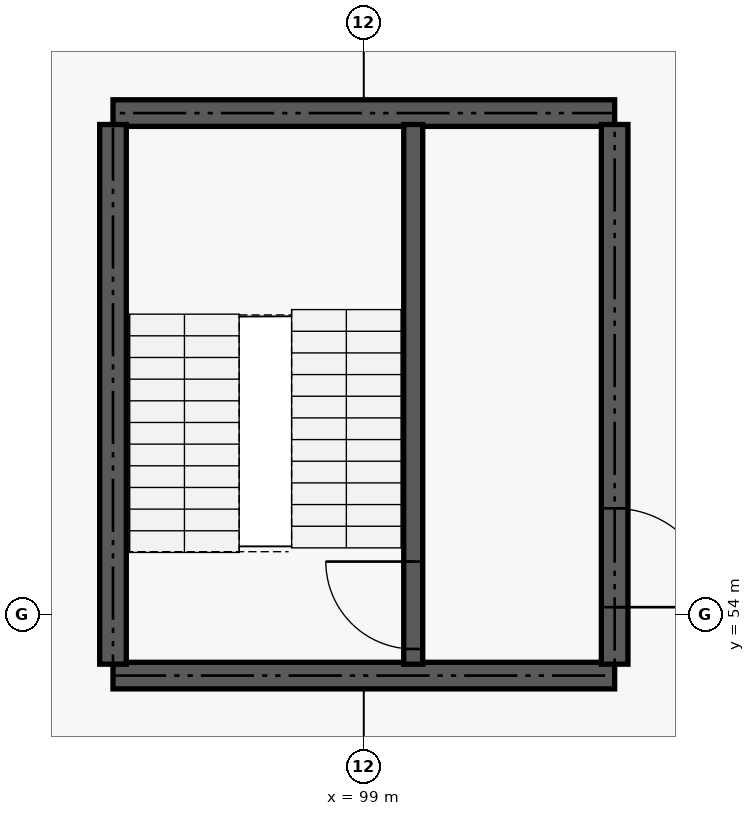
"""IFC4 building model, lengths in metres.
Left out: names, types, materials, properties, quantities, classifications, styles, units other than length and angle.
Written with IfcOpenShell. Run it as: python <this file> out.ifc"""

import sys

from ifc_helpers import new_model, si_unit, direction, frame, frame_2d, origin, place, context, subcontext, project, spatial, rectangle, extrude, element, fill, save


model = new_model("IFC4")
c1 = context("Model", 3, precision=1e-05, world=origin(), true_north=direction((0.0, 1.0)))
c2 = subcontext(c1, "Body", "Model", "MODEL_VIEW")
j1 = project(units=[si_unit("LENGTHUNIT", "METRE"), si_unit("PLANEANGLEUNIT", "RADIAN")], contexts=[c1])
p1 = place(None, origin())
s1 = spatial("IfcSite", under=j1, at=p1, CompositionType="ELEMENT")
p2 = place(p1, origin())
s2 = spatial("IfcBuilding", under=s1, at=p2, CompositionType="ELEMENT")
p3 = place(p2, frame((0.0, 0.0, 5.4)))
s3 = spatial("IfcBuildingStorey", under=s2, at=p3, CompositionType="ELEMENT", Elevation=5.4)
for number, where, z_axis, x_axis in (
    (1, (95.7, 53.2, 0.0), (0.0, 0.0, 1.0), (1.0, 0.0, 0.0)),
    (2, (95.7, 60.6, 0.0), (0.0, 0.0, 1.0), (1.0, 0.0, 0.0)),
):
    element("IfcWall", number, at=place(p3, frame(where, z_axis=z_axis, x_axis=x_axis)), inside=s3, PredefinedType="SHEAR", context=c2, shape_type="SweptSolid", body=[
        extrude(rectangle(XDim=6.6, YDim=0.35, at=frame_2d((3.3, 0.0))), origin(), (0.0, 0.0, 1.0), 4.2),
    ])
p4 = place(p3, frame((95.7, 53.35, 0.0), z_axis=(0.0, 0.0, 1.0), x_axis=(0.0, 1.0, 0.0)))
e3 = element("IfcWall", 3, at=p4, inside=s3, PredefinedType="SHEAR", context=c2, shape_type="SweptSolid", body=[
    extrude(rectangle(XDim=7.1, YDim=0.35, at=frame_2d((3.55, 0.0))), origin(), (0.0, 0.0, 1.0), 4.2),
])
p5 = place(p3, frame((102.3, 53.35, 0.0), z_axis=(0.0, 0.0, 1.0), x_axis=(0.0, 1.0, 0.0)))
e4 = element("IfcWall", 4, at=p5, inside=s3, PredefinedType="SHEAR", context=c2, shape_type="SweptSolid", body=[
    extrude(rectangle(XDim=7.1, YDim=0.35, at=frame_2d((3.55, 0.0))), origin(), (0.0, 0.0, 1.0), 4.2),
])
p6 = place(p5, frame((0.75, 0.0, 0.0)))
e5 = element("IfcOpeningElement", 5, at=p6, cuts=e4, PredefinedType="OPENING", context=c2, shape_type="SweptSolid", body=[
    extrude(rectangle(XDim=1.3, YDim=2.15, at=frame_2d((0.65, 1.075))), frame((0.0, 0.185, 0.0), z_axis=(0.0, -1.0, 0.0), x_axis=(1.0, 0.0, 0.0)), (0.0, 0.0, 1.0), 0.37),
])
p7 = place(p3, frame((99.65, 53.35, 0.0), z_axis=(0.0, 0.0, 1.0), x_axis=(0.0, 1.0, 0.0)))
e6 = element("IfcWall", 6, at=p7, inside=s3, PredefinedType="SHEAR", context=c2, shape_type="SweptSolid", body=[
    extrude(rectangle(XDim=7.1, YDim=0.25, at=frame_2d((3.55, 0.0))), origin(), (0.0, 0.0, 1.0), 4.2),
])
p8 = place(p7, frame((0.2, 0.0, 0.0)))
e7 = element("IfcOpeningElement", 7, at=p8, cuts=e6, PredefinedType="OPENING", context=c2, shape_type="SweptSolid", body=[
    extrude(rectangle(XDim=1.15, YDim=2.15, at=frame_2d((0.575, 1.075))), frame((0.0, 0.135, 0.0), z_axis=(0.0, -1.0, 0.0), x_axis=(1.0, 0.0, 0.0)), (0.0, 0.0, 1.0), 0.27),
])
p9 = place(p6, frame((1.3, 0.0, 0.0), z_axis=(0.0, 0.0, 1.0), x_axis=(-1.0, 0.0, 0.0)))
e8 = element("IfcDoor", 8, at=p9, inside=s3, OperationType="DOUBLE_DOOR_SINGLE_SWING", PredefinedType="DOOR", context=c2, shape_type="SweptSolid", body=[
    extrude(rectangle(XDim=1.3, YDim=2.15, at=frame_2d((0.65, 1.075))), frame((0.0, 0.025, 0.0), z_axis=(0.0, -1.0, 0.0), x_axis=(1.0, 0.0, 0.0)), (0.0, 0.0, 1.0), 0.05),
])
fill(e5, e8)
p10 = place(p8, frame((1.15, 0.0, 0.0), z_axis=(0.0, 0.0, 1.0), x_axis=(-1.0, 0.0, 0.0)))
e9 = element("IfcDoor", 9, at=p10, inside=s3, OperationType="SINGLE_SWING_RIGHT", PredefinedType="DOOR", context=c2, shape_type="SweptSolid", body=[
    extrude(rectangle(XDim=1.15, YDim=2.15, at=frame_2d((0.575, 1.075))), frame((0.0, 0.025, 0.0), z_axis=(0.0, -1.0, 0.0), x_axis=(1.0, 0.0, 0.0)), (0.0, 0.0, 1.0), 0.05),
])
fill(e7, e9)
save(model, sys.argv[1])
